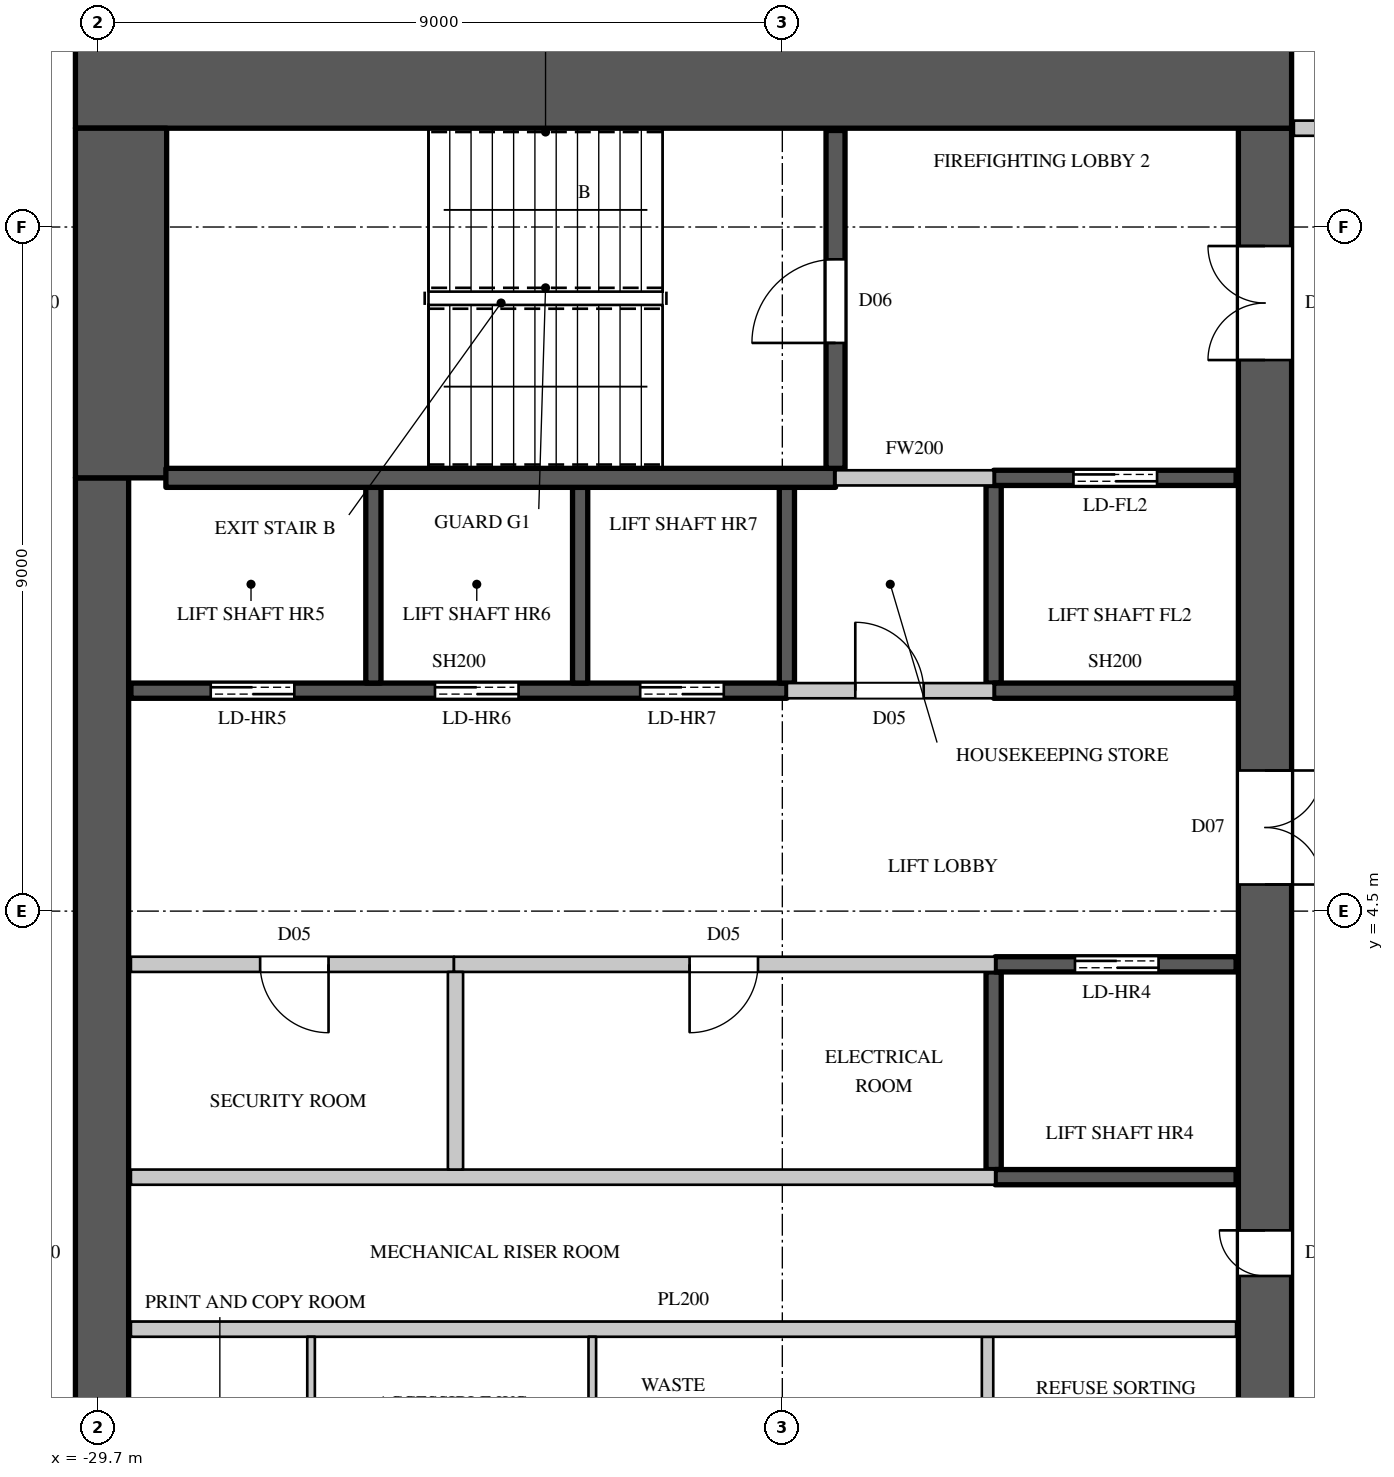
"""IFC4 building model, lengths in metres.
Left out: names, types, materials, properties, quantities, classifications, styles, units other than length and angle.
Written with IfcOpenShell. Run it as: python <this file> out.ifc"""

import sys

from ifc_helpers import new_model, si_unit, direction, frame, frame_2d, origin, place, context, subcontext, project, spatial, rectangle, extrude, element, fill, save


model = new_model("IFC4")
c1 = context("Model", 3, precision=1e-05, world=origin(), true_north=direction((0.0, 1.0)))
c2 = subcontext(c1, "Body", "Model", "MODEL_VIEW")
j1 = project(units=[si_unit("LENGTHUNIT", "METRE"), si_unit("PLANEANGLEUNIT", "RADIAN")], contexts=[c1])
p1 = place(None, origin())
s1 = spatial("IfcSite", under=j1, at=p1, CompositionType="ELEMENT")
p2 = place(p1, origin())
s2 = spatial("IfcBuilding", under=s1, at=p2, CompositionType="ELEMENT")
p3 = place(p2, frame((0.0, 0.0, 276.2)))
s3 = spatial("IfcBuildingStorey", under=s2, at=p3, CompositionType="ELEMENT", Elevation=276.2)
p4 = place(p3, frame((-30.0, 15.4, 0.0), z_axis=(0.0, 0.0, 1.0), x_axis=(1.0, 0.0, 0.0)))
e1 = element("IfcWall", 1, at=p4, inside=s3, PredefinedType="SHEAR", context=c2, shape_type="SweptSolid", body=[
    extrude(rectangle(XDim=16.0, YDim=1.2, at=frame_2d((8.0, 0.0))), origin(), (0.0, 0.0, 1.0), 4.1),
])
p5 = place(p3, frame((-14.35, -14.8, 0.0), z_axis=(0.0, 0.0, 1.0), x_axis=(0.0, 1.0, 0.0)))
e2 = element("IfcWall", 2, at=p5, inside=s3, PredefinedType="SHEAR", context=c2, shape_type="SweptSolid", body=[
    extrude(rectangle(XDim=29.6, YDim=0.7, at=frame_2d((14.8, 0.0))), origin(), (0.0, 0.0, 1.0), 4.1),
])
p6 = place(p5, frame((1.55, 0.0, 0.0)))
e3 = element("IfcOpeningElement", 3, at=p6, cuts=e2, PredefinedType="OPENING", context=c2, shape_type="SweptSolid", body=[
    extrude(rectangle(XDim=1.5, YDim=2.4, at=frame_2d((0.75, 1.2))), frame((0.0, 0.36, 0.0), z_axis=(0.0, -1.0, 0.0), x_axis=(1.0, 0.0, 0.0)), (0.0, 0.0, 1.0), 0.72),
])
p7 = place(p5, frame((26.55, 0.0, 0.0)))
e4 = element("IfcOpeningElement", 4, at=p7, cuts=e2, PredefinedType="OPENING", context=c2, shape_type="SweptSolid", body=[
    extrude(rectangle(XDim=1.5, YDim=2.4, at=frame_2d((0.75, 1.2))), frame((0.0, 0.36, 0.0), z_axis=(0.0, -1.0, 0.0), x_axis=(1.0, 0.0, 0.0)), (0.0, 0.0, 1.0), 0.72),
])
p8 = place(p5, frame((8.45, 0.0, 0.0)))
e5 = element("IfcOpeningElement", 5, at=p8, cuts=e2, PredefinedType="OPENING", context=c2, shape_type="SweptSolid", body=[
    extrude(rectangle(XDim=1.5, YDim=2.4, at=frame_2d((0.75, 1.2))), frame((0.0, 0.36, 0.0), z_axis=(0.0, -1.0, 0.0), x_axis=(1.0, 0.0, 0.0)), (0.0, 0.0, 1.0), 0.72),
])
p9 = place(p5, frame((19.65, 0.0, 0.0)))
e6 = element("IfcOpeningElement", 6, at=p9, cuts=e2, PredefinedType="OPENING", context=c2, shape_type="SweptSolid", body=[
    extrude(rectangle(XDim=1.5, YDim=2.4, at=frame_2d((0.75, 1.2))), frame((0.0, 0.36, 0.0), z_axis=(0.0, -1.0, 0.0), x_axis=(1.0, 0.0, 0.0)), (0.0, 0.0, 1.0), 0.72),
])
p10 = place(p5, frame((14.5, 0.0, 0.0)))
e7 = element("IfcOpeningElement", 7, at=p10, cuts=e2, PredefinedType="OPENING", context=c2, shape_type="SweptSolid", body=[
    extrude(rectangle(XDim=0.6, YDim=2.0, at=frame_2d((0.3, 1.0))), frame((0.0, 0.36, 0.0), z_axis=(0.0, -1.0, 0.0), x_axis=(1.0, 0.0, 0.0)), (0.0, 0.0, 1.0), 0.72),
])
p11 = place(p3, frame((-29.65, -10.2, 0.0), z_axis=(0.0, 0.0, 1.0), x_axis=(0.0, 1.0, 0.0)))
e8 = element("IfcWall", 8, at=p11, inside=s3, PredefinedType="SHEAR", context=c2, shape_type="SweptSolid", body=[
    extrude(rectangle(XDim=20.4, YDim=0.7, at=frame_2d((10.2, 0.0))), origin(), (0.0, 0.0, 1.0), 4.1),
])
p12 = place(p3, frame((-29.4, 10.2, 0.0), z_axis=(0.0, 0.0, 1.0), x_axis=(0.0, 1.0, 0.0)))
e9 = element("IfcWall", 9, at=p12, inside=s3, PredefinedType="SHEAR", context=c2, shape_type="SweptSolid", body=[
    extrude(rectangle(XDim=4.6, YDim=1.2, at=frame_2d((2.3, 0.0))), origin(), (0.0, 0.0, 1.0), 4.1),
])
p13 = place(p3, frame((-29.27, 3.8, 0.0), z_axis=(0.0, 0.0, 1.0), x_axis=(1.0, 0.0, 0.0)))
e10 = element("IfcWall", 10, at=p13, inside=s3, PredefinedType="PARTITIONING", context=c2, shape_type="SweptSolid", body=[
    extrude(rectangle(XDim=4.25, YDim=0.2, at=frame_2d((2.125, 0.0))), origin(), (0.0, 0.0, 1.0), 3.8),
])
p14 = place(p13, frame((1.7, 0.0, 0.0)))
e11 = element("IfcOpeningElement", 11, at=p14, cuts=e10, PredefinedType="OPENING", context=c2, shape_type="SweptSolid", body=[
    extrude(rectangle(XDim=0.9, YDim=2.2, at=frame_2d((0.45, 1.1))), frame((0.0, 0.11, 0.0), z_axis=(0.0, -1.0, 0.0), x_axis=(1.0, 0.0, 0.0)), (0.0, 0.0, 1.0), 0.22),
])
p15 = place(p3, frame((-20.64, 7.4, 0.0), z_axis=(0.0, 0.0, 1.0), x_axis=(1.0, 0.0, 0.0)))
e12 = element("IfcWall", 12, at=p15, inside=s3, PredefinedType="PARTITIONING", context=c2, shape_type="SweptSolid", body=[
    extrude(rectangle(XDim=2.72, YDim=0.2, at=frame_2d((1.36, 0.0))), origin(), (0.0, 0.0, 1.0), 3.8),
])
p16 = place(p15, frame((0.9, 0.0, 0.0)))
e13 = element("IfcOpeningElement", 13, at=p16, cuts=e12, PredefinedType="OPENING", context=c2, shape_type="SweptSolid", body=[
    extrude(rectangle(XDim=0.9, YDim=2.2, at=frame_2d((0.45, 1.1))), frame((0.0, 0.11, 0.0), z_axis=(0.0, -1.0, 0.0), x_axis=(1.0, 0.0, 0.0)), (0.0, 0.0, 1.0), 0.22),
])
p17 = place(p3, frame((-20.0, 10.2, 0.0), z_axis=(0.0, 0.0, 1.0), x_axis=(1.0, 0.0, 0.0)))
e14 = element("IfcWall", 14, at=p17, inside=s3, PredefinedType="PARTITIONING", context=c2, shape_type="SweptSolid", body=[
    extrude(rectangle(XDim=2.08, YDim=0.2, at=frame_2d((1.04, 0.0))), origin(), (0.0, 0.0, 1.0), 3.8),
])
p18 = place(p3, frame((-13.97, 14.8, 0.0), z_axis=(0.0, 0.0, 1.0), x_axis=(1.0, 0.0, 0.0)))
e15 = element("IfcWall", 15, at=p18, inside=s3, PredefinedType="PARTITIONING", context=c2, shape_type="SweptSolid", body=[
    extrude(rectangle(XDim=3.07, YDim=0.2, at=frame_2d((1.535, 0.0))), origin(), (0.0, 0.0, 1.0), 3.8),
])
p19 = place(p3, frame((-18.0, -3.7, 0.0), z_axis=(0.0, 0.0, 1.0), x_axis=(0.0, 1.0, 0.0)))
e16 = element("IfcWall", 16, at=p19, inside=s3, PredefinedType="PARTITIONING", context=c2, shape_type="SweptSolid", body=[
    extrude(rectangle(XDim=2.6, YDim=0.15, at=frame_2d((1.3, 0.0))), origin(), (0.0, 0.0, 1.0), 3.8),
])
p20 = place(p3, frame((-29.27, -1.0, 0.0), z_axis=(0.0, 0.0, 1.0), x_axis=(1.0, 0.0, 0.0)))
e17 = element("IfcWall", 17, at=p20, inside=s3, PredefinedType="PARTITIONING", context=c2, shape_type="SweptSolid", body=[
    extrude(rectangle(XDim=14.54, YDim=0.2, at=frame_2d((7.27, 0.0))), origin(), (0.0, 0.0, 1.0), 3.8),
])
p21 = place(p3, frame((-29.27, 1.0, 0.0), z_axis=(0.0, 0.0, 1.0), x_axis=(1.0, 0.0, 0.0)))
e18 = element("IfcWall", 18, at=p21, inside=s3, PredefinedType="PARTITIONING", context=c2, shape_type="SweptSolid", body=[
    extrude(rectangle(XDim=11.37, YDim=0.2, at=frame_2d((5.685, 0.0))), origin(), (0.0, 0.0, 1.0), 3.8),
])
p22 = place(p3, frame((-25.02, 3.8, 0.0), z_axis=(0.0, 0.0, 1.0), x_axis=(1.0, 0.0, 0.0)))
e19 = element("IfcWall", 19, at=p22, inside=s3, PredefinedType="PARTITIONING", context=c2, shape_type="SweptSolid", body=[
    extrude(rectangle(XDim=7.12, YDim=0.2, at=frame_2d((3.56, 0.0))), origin(), (0.0, 0.0, 1.0), 3.8),
])
p23 = place(p22, frame((3.1, 0.0, 0.0)))
e20 = element("IfcOpeningElement", 20, at=p23, cuts=e19, PredefinedType="OPENING", context=c2, shape_type="SweptSolid", body=[
    extrude(rectangle(XDim=0.9, YDim=2.2, at=frame_2d((0.45, 1.1))), frame((0.0, 0.11, 0.0), z_axis=(0.0, -1.0, 0.0), x_axis=(1.0, 0.0, 0.0)), (0.0, 0.0, 1.0), 0.22),
])
p24 = place(p3, frame((-25.0, 1.1, 0.0), z_axis=(0.0, 0.0, 1.0), x_axis=(0.0, 1.0, 0.0)))
e21 = element("IfcWall", 21, at=p24, inside=s3, PredefinedType="PARTITIONING", context=c2, shape_type="SweptSolid", body=[
    extrude(rectangle(XDim=2.6, YDim=0.2, at=frame_2d((1.3, 0.0))), origin(), (0.0, 0.0, 1.0), 3.8),
])
p25 = place(p3, frame((-29.27, 7.4, 0.0), z_axis=(0.0, 0.0, 1.0), x_axis=(1.0, 0.0, 0.0)))
e22 = element("IfcWall", 22, at=p25, inside=s3, PredefinedType="SHEAR", context=c2, shape_type="SweptSolid", body=[
    extrude(rectangle(XDim=8.63, YDim=0.2, at=frame_2d((4.315, 0.0))), origin(), (0.0, 0.0, 1.0), 3.8),
])
p26 = place(p25, frame((1.05, 0.0, 0.0)))
e23 = element("IfcOpeningElement", 23, at=p26, cuts=e22, PredefinedType="OPENING", context=c2, shape_type="SweptSolid", body=[
    extrude(rectangle(XDim=1.1, YDim=2.2, at=frame_2d((0.55, 1.1))), frame((0.0, 0.11, 0.0), z_axis=(0.0, -1.0, 0.0), x_axis=(1.0, 0.0, 0.0)), (0.0, 0.0, 1.0), 0.22),
])
p27 = place(p25, frame((4.0, 0.0, 0.0)))
e24 = element("IfcOpeningElement", 24, at=p27, cuts=e22, PredefinedType="OPENING", context=c2, shape_type="SweptSolid", body=[
    extrude(rectangle(XDim=1.1, YDim=2.2, at=frame_2d((0.55, 1.1))), frame((0.0, 0.11, 0.0), z_axis=(0.0, -1.0, 0.0), x_axis=(1.0, 0.0, 0.0)), (0.0, 0.0, 1.0), 0.22),
])
p28 = place(p25, frame((6.7, 0.0, 0.0)))
e25 = element("IfcOpeningElement", 25, at=p28, cuts=e22, PredefinedType="OPENING", context=c2, shape_type="SweptSolid", body=[
    extrude(rectangle(XDim=1.1, YDim=2.2, at=frame_2d((0.55, 1.1))), frame((0.0, 0.11, 0.0), z_axis=(0.0, -1.0, 0.0), x_axis=(1.0, 0.0, 0.0)), (0.0, 0.0, 1.0), 0.22),
])
for number, where, z_axis, x_axis in (
    (26, (-26.08, 7.5, 0.0), (0.0, 0.0, 1.0), (0.0, 1.0, 0.0)),
    (27, (-23.36, 7.5, 0.0), (0.0, 0.0, 1.0), (0.0, 1.0, 0.0)),
):
    element("IfcWall", number, at=place(p3, frame(where, z_axis=z_axis, x_axis=x_axis)), inside=s3, PredefinedType="SHEAR", context=c2, shape_type="SweptSolid", body=[
        extrude(rectangle(XDim=2.575, YDim=0.2, at=frame_2d((1.288, 0.0))), origin(), (0.0, 0.0, 1.0), 4.1),
    ])
p29 = place(p3, frame((-20.64, 7.5, 0.0), z_axis=(0.0, 0.0, 1.0), x_axis=(0.0, 1.0, 0.0)))
e28 = element("IfcWall", 28, at=p29, inside=s3, PredefinedType="SHEAR", context=c2, shape_type="SweptSolid", body=[
    extrude(rectangle(XDim=2.575, YDim=0.2, at=frame_2d((1.288, 0.0))), origin(), (0.0, 0.0, 1.0), 3.8),
])
p30 = place(p3, frame((-17.92, 1.1, 0.0), z_axis=(0.0, 0.0, 1.0), x_axis=(0.0, 1.0, 0.0)))
e29 = element("IfcWall", 29, at=p30, inside=s3, PredefinedType="SHEAR", context=c2, shape_type="SweptSolid", body=[
    extrude(rectangle(XDim=2.6, YDim=0.2, at=frame_2d((1.3, 0.0))), origin(), (0.0, 0.0, 1.0), 3.8),
])
p31 = place(p3, frame((-17.9, 1.0, 0.0), z_axis=(0.0, 0.0, 1.0), x_axis=(1.0, 0.0, 0.0)))
e30 = element("IfcWall", 30, at=p31, inside=s3, PredefinedType="SHEAR", context=c2, shape_type="SweptSolid", body=[
    extrude(rectangle(XDim=3.17, YDim=0.2, at=frame_2d((1.585, 0.0))), origin(), (0.0, 0.0, 1.0), 3.8),
])
p32 = place(p3, frame((-17.9, 3.8, 0.0), z_axis=(0.0, 0.0, 1.0), x_axis=(1.0, 0.0, 0.0)))
e31 = element("IfcWall", 31, at=p32, inside=s3, PredefinedType="SHEAR", context=c2, shape_type="SweptSolid", body=[
    extrude(rectangle(XDim=3.17, YDim=0.2, at=frame_2d((1.585, 0.0))), origin(), (0.0, 0.0, 1.0), 3.8),
])
p33 = place(p32, frame((1.05, 0.0, 0.0)))
e32 = element("IfcOpeningElement", 32, at=p33, cuts=e31, PredefinedType="OPENING", context=c2, shape_type="SweptSolid", body=[
    extrude(rectangle(XDim=1.1, YDim=2.2, at=frame_2d((0.55, 1.1))), frame((0.0, 0.11, 0.0), z_axis=(0.0, -1.0, 0.0), x_axis=(1.0, 0.0, 0.0)), (0.0, 0.0, 1.0), 0.22),
])
p34 = place(p3, frame((-17.92, 7.5, 0.0), z_axis=(0.0, 0.0, 1.0), x_axis=(0.0, 1.0, 0.0)))
e33 = element("IfcWall", 33, at=p34, inside=s3, PredefinedType="SHEAR", context=c2, shape_type="SweptSolid", body=[
    extrude(rectangle(XDim=2.6, YDim=0.2, at=frame_2d((1.3, 0.0))), origin(), (0.0, 0.0, 1.0), 3.8),
])
p35 = place(p3, frame((-17.92, 7.4, 0.0), z_axis=(0.0, 0.0, 1.0), x_axis=(1.0, 0.0, 0.0)))
e34 = element("IfcWall", 34, at=p35, inside=s3, PredefinedType="SHEAR", context=c2, shape_type="SweptSolid", body=[
    extrude(rectangle(XDim=3.19, YDim=0.2, at=frame_2d((1.595, 0.0))), origin(), (0.0, 0.0, 1.0), 3.8),
])
p36 = place(p3, frame((-17.92, 10.2, 0.0), z_axis=(0.0, 0.0, 1.0), x_axis=(1.0, 0.0, 0.0)))
e35 = element("IfcWall", 35, at=p36, inside=s3, PredefinedType="SHEAR", context=c2, shape_type="SweptSolid", body=[
    extrude(rectangle(XDim=3.19, YDim=0.2, at=frame_2d((1.595, 0.0))), origin(), (0.0, 0.0, 1.0), 3.8),
])
p37 = place(p36, frame((1.05, 0.0, 0.0)))
e36 = element("IfcOpeningElement", 36, at=p37, cuts=e35, PredefinedType="OPENING", context=c2, shape_type="SweptSolid", body=[
    extrude(rectangle(XDim=1.1, YDim=2.2, at=frame_2d((0.55, 1.1))), frame((0.0, 0.11, 0.0), z_axis=(0.0, -1.0, 0.0), x_axis=(1.0, 0.0, 0.0)), (0.0, 0.0, 1.0), 0.22),
])
p38 = place(p3, frame((-28.81, 10.2, 0.0), z_axis=(0.0, 0.0, 1.0), x_axis=(1.0, 0.0, 0.0)))
e37 = element("IfcWall", 37, at=p38, inside=s3, PredefinedType="SHEAR", context=c2, shape_type="SweptSolid", body=[
    extrude(rectangle(XDim=8.81, YDim=0.25, at=frame_2d((4.405, 0.0))), origin(), (0.0, 0.0, 1.0), 3.8),
])
p39 = place(p3, frame((-20.0, 10.325, 0.0), z_axis=(0.0, 0.0, 1.0), x_axis=(0.0, 1.0, 0.0)))
e38 = element("IfcWall", 38, at=p39, inside=s3, PredefinedType="SHEAR", context=c2, shape_type="SweptSolid", body=[
    extrude(rectangle(XDim=4.445, YDim=0.25, at=frame_2d((2.223, 0.0))), origin(), (0.0, 0.0, 1.0), 3.8),
])
p40 = place(p39, frame((1.65, 0.0, 0.0)))
e39 = element("IfcOpeningElement", 39, at=p40, cuts=e38, PredefinedType="OPENING", context=c2, shape_type="SweptSolid", body=[
    extrude(rectangle(XDim=1.1, YDim=2.2, at=frame_2d((0.55, 1.1))), frame((0.0, 0.135, 0.0), z_axis=(0.0, -1.0, 0.0), x_axis=(1.0, 0.0, 0.0)), (0.0, 0.0, 1.0), 0.27),
])
for number, where, z_axis, x_axis in (
    (40, (-26.9, -3.7, 0.0), (0.0, 0.0, 1.0), (0.0, 1.0, 0.0)),
    (41, (-23.2, -3.7, 0.0), (0.0, 0.0, 1.0), (0.0, 1.0, 0.0)),
):
    element("IfcWall", number, at=place(p3, frame(where, z_axis=z_axis, x_axis=x_axis)), inside=s3, PredefinedType="PARTITIONING", context=c2, shape_type="SweptSolid", body=[
        extrude(rectangle(XDim=2.6, YDim=0.1, at=frame_2d((1.3, 0.0))), origin(), (0.0, 0.0, 1.0), 3.8),
    ])
p41 = place(p40, origin())
e42 = element("IfcDoor", 42, at=p41, inside=s3, OperationType="SINGLE_SWING_LEFT", PredefinedType="DOOR", context=c2, shape_type="SweptSolid", body=[
    extrude(rectangle(XDim=1.1, YDim=2.2, at=frame_2d((0.55, 1.1))), frame((0.0, 0.025, 0.0), z_axis=(0.0, -1.0, 0.0), x_axis=(1.0, 0.0, 0.0)), (0.0, 0.0, 1.0), 0.05),
])
fill(e39, e42)
p42 = place(p14, origin())
e43 = element("IfcDoor", 43, at=p42, inside=s3, OperationType="SINGLE_SWING_LEFT", PredefinedType="DOOR", context=c2, shape_type="SweptSolid", body=[
    extrude(rectangle(XDim=0.9, YDim=2.2, at=frame_2d((0.45, 1.1))), frame((0.0, 0.025, 0.0), z_axis=(0.0, -1.0, 0.0), x_axis=(1.0, 0.0, 0.0)), (0.0, 0.0, 1.0), 0.05),
])
fill(e11, e43)
p43 = place(p23, origin())
e44 = element("IfcDoor", 44, at=p43, inside=s3, OperationType="SINGLE_SWING_RIGHT", PredefinedType="DOOR", context=c2, shape_type="SweptSolid", body=[
    extrude(rectangle(XDim=0.9, YDim=2.2, at=frame_2d((0.45, 1.1))), frame((0.0, 0.025, 0.0), z_axis=(0.0, -1.0, 0.0), x_axis=(1.0, 0.0, 0.0)), (0.0, 0.0, 1.0), 0.05),
])
fill(e20, e44)
p44 = place(p16, origin())
e45 = element("IfcDoor", 45, at=p44, inside=s3, OperationType="SINGLE_SWING_LEFT", PredefinedType="DOOR", context=c2, shape_type="SweptSolid", body=[
    extrude(rectangle(XDim=0.9, YDim=2.2, at=frame_2d((0.45, 1.1))), frame((0.0, 0.025, 0.0), z_axis=(0.0, -1.0, 0.0), x_axis=(1.0, 0.0, 0.0)), (0.0, 0.0, 1.0), 0.05),
])
fill(e13, e45)
p45 = place(p33, origin())
e46 = element("IfcDoor", 46, at=p45, inside=s3, OperationType="DOUBLE_DOOR_SLIDING", PredefinedType="DOOR", context=c2, shape_type="SweptSolid", body=[
    extrude(rectangle(XDim=1.1, YDim=2.2, at=frame_2d((0.55, 1.1))), frame((0.0, 0.025, 0.0), z_axis=(0.0, -1.0, 0.0), x_axis=(1.0, 0.0, 0.0)), (0.0, 0.0, 1.0), 0.05),
])
fill(e32, e46)
p46 = place(p26, origin())
e47 = element("IfcDoor", 47, at=p46, inside=s3, OperationType="DOUBLE_DOOR_SLIDING", PredefinedType="DOOR", context=c2, shape_type="SweptSolid", body=[
    extrude(rectangle(XDim=1.1, YDim=2.2, at=frame_2d((0.55, 1.1))), frame((0.0, 0.025, 0.0), z_axis=(0.0, -1.0, 0.0), x_axis=(1.0, 0.0, 0.0)), (0.0, 0.0, 1.0), 0.05),
])
fill(e23, e47)
p47 = place(p27, origin())
e48 = element("IfcDoor", 48, at=p47, inside=s3, OperationType="DOUBLE_DOOR_SLIDING", PredefinedType="DOOR", context=c2, shape_type="SweptSolid", body=[
    extrude(rectangle(XDim=1.1, YDim=2.2, at=frame_2d((0.55, 1.1))), frame((0.0, 0.025, 0.0), z_axis=(0.0, -1.0, 0.0), x_axis=(1.0, 0.0, 0.0)), (0.0, 0.0, 1.0), 0.05),
])
fill(e24, e48)
p48 = place(p28, origin())
e49 = element("IfcDoor", 49, at=p48, inside=s3, OperationType="DOUBLE_DOOR_SLIDING", PredefinedType="DOOR", context=c2, shape_type="SweptSolid", body=[
    extrude(rectangle(XDim=1.1, YDim=2.2, at=frame_2d((0.55, 1.1))), frame((0.0, 0.025, 0.0), z_axis=(0.0, -1.0, 0.0), x_axis=(1.0, 0.0, 0.0)), (0.0, 0.0, 1.0), 0.05),
])
fill(e25, e49)
p49 = place(p37, origin())
e50 = element("IfcDoor", 50, at=p49, inside=s3, OperationType="DOUBLE_DOOR_SLIDING", PredefinedType="DOOR", context=c2, shape_type="SweptSolid", body=[
    extrude(rectangle(XDim=1.1, YDim=2.2, at=frame_2d((0.55, 1.1))), frame((0.0, 0.025, 0.0), z_axis=(0.0, -1.0, 0.0), x_axis=(1.0, 0.0, 0.0)), (0.0, 0.0, 1.0), 0.05),
])
fill(e36, e50)
p50 = place(p7, origin())
e51 = element("IfcDoor", 51, at=p50, inside=s3, OperationType="DOUBLE_DOOR_SINGLE_SWING", PredefinedType="DOOR", context=c2, shape_type="SweptSolid", body=[
    extrude(rectangle(XDim=1.5, YDim=2.4, at=frame_2d((0.75, 1.2))), frame((0.0, 0.345, 0.0), z_axis=(0.0, -1.0, 0.0), x_axis=(1.0, 0.0, 0.0)), (0.0, 0.0, 1.0), 0.05),
])
fill(e4, e51)
p51 = place(p9, origin())
e52 = element("IfcDoor", 52, at=p51, inside=s3, OperationType="DOUBLE_DOOR_SINGLE_SWING", PredefinedType="DOOR", context=c2, shape_type="SweptSolid", body=[
    extrude(rectangle(XDim=1.5, YDim=2.4, at=frame_2d((0.75, 1.2))), frame((0.0, -0.295, 0.0), z_axis=(0.0, -1.0, 0.0), x_axis=(1.0, 0.0, 0.0)), (0.0, 0.0, 1.0), 0.05),
])
fill(e6, e52)
p52 = place(p10, origin())
e53 = element("IfcDoor", 53, at=p52, inside=s3, OperationType="SINGLE_SWING_RIGHT", PredefinedType="DOOR", context=c2, shape_type="SweptSolid", body=[
    extrude(rectangle(XDim=0.6, YDim=2.0, at=frame_2d((0.3, 1.0))), frame((0.0, 0.345, 0.0), z_axis=(0.0, -1.0, 0.0), x_axis=(1.0, 0.0, 0.0)), (0.0, 0.0, 1.0), 0.05),
])
fill(e7, e53)
save(model, sys.argv[1])
